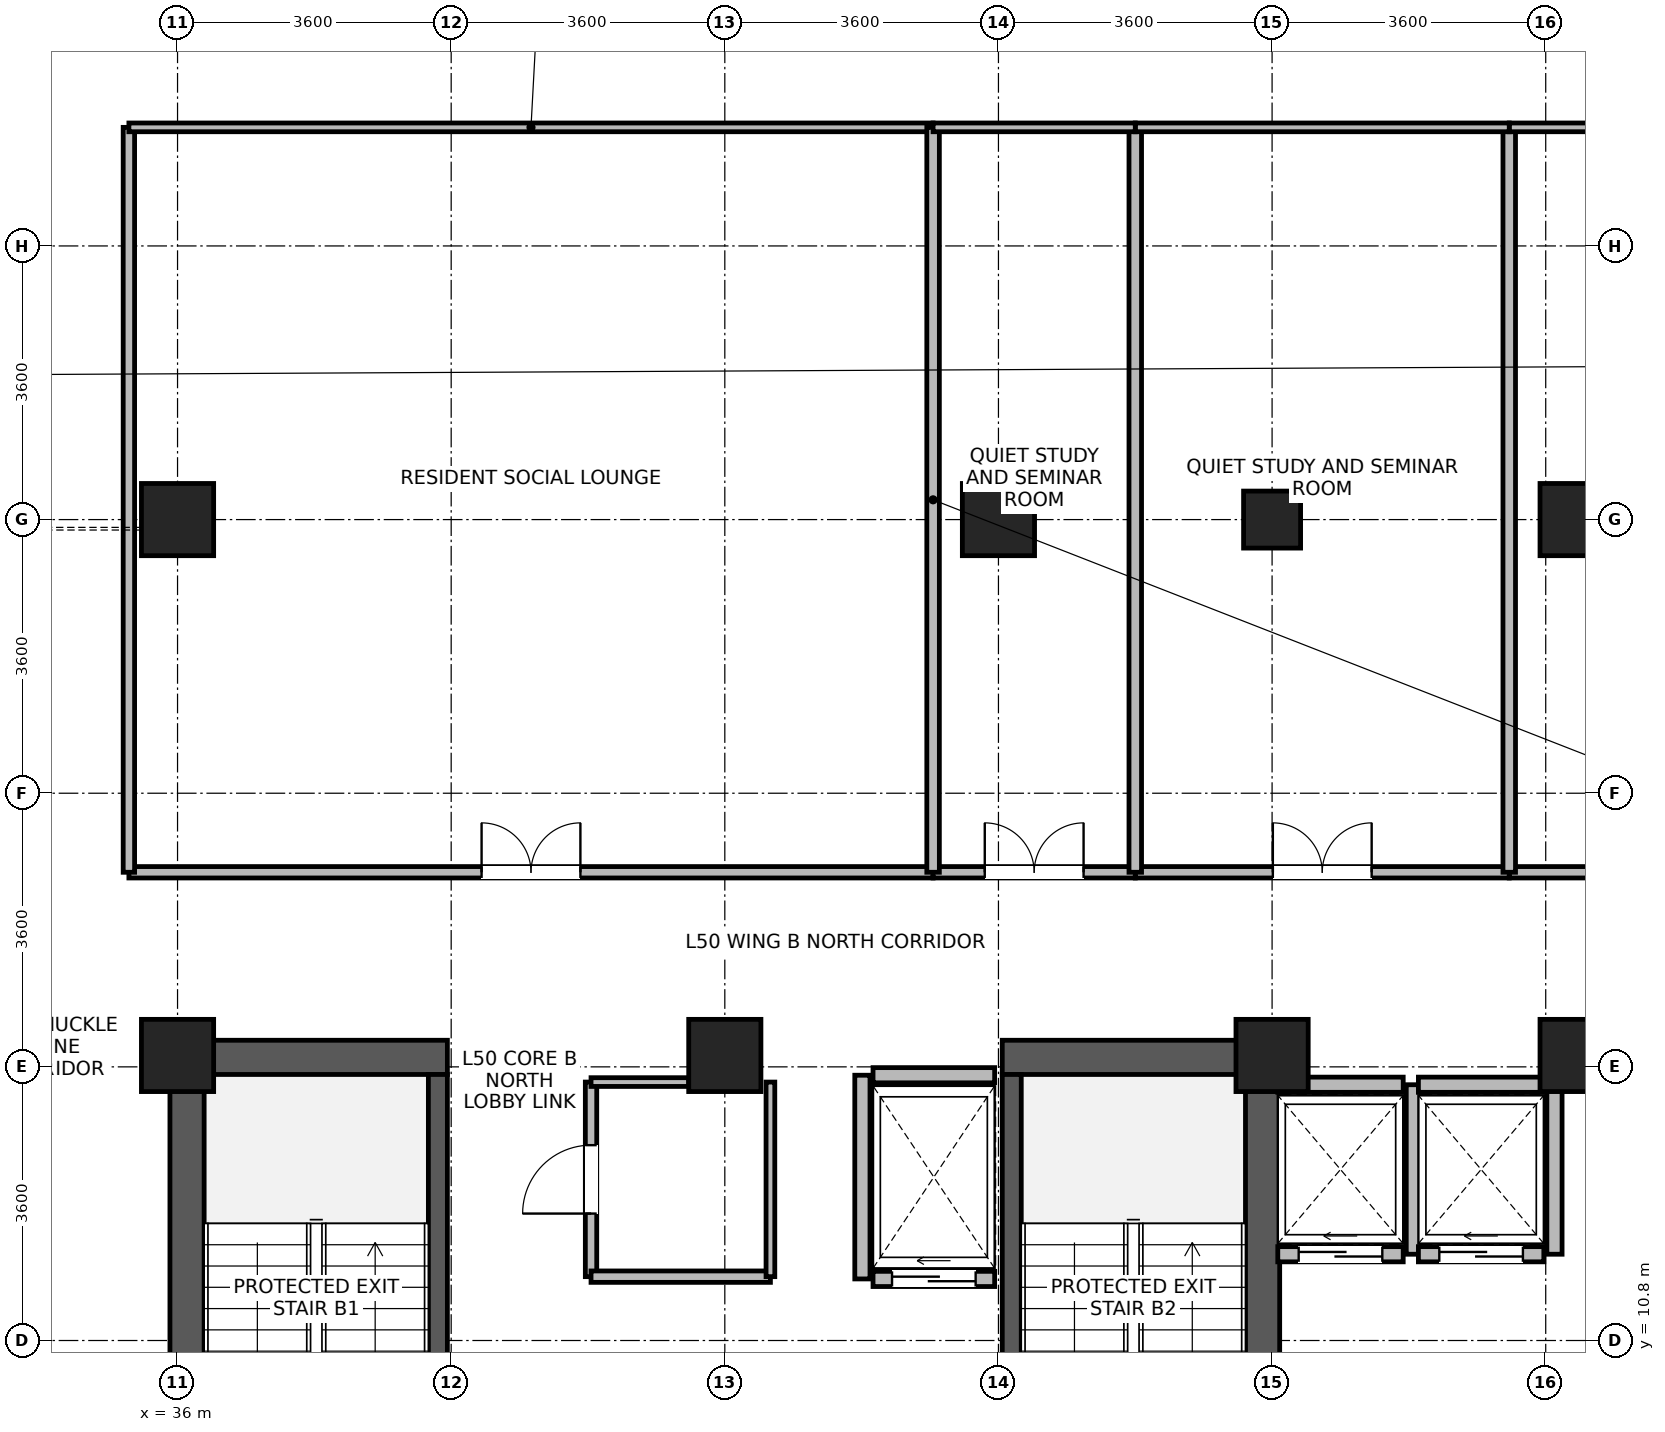
"""IFC4 building model, lengths in metres.
Left out: names, types, materials, properties, quantities, classifications, styles, units other than length and angle.
Written with IfcOpenShell. Run it as: python <this file> out.ifc"""

import sys

from ifc_helpers import new_model, si_unit, direction, frame, frame_2d, origin, origin_2d, place, context, subcontext, project, spatial, rectangle, extrude, source, transform, mapped, element, fill, save


model = new_model("IFC4")
c1 = context("Model", 3, precision=1e-05, world=origin(), true_north=direction((0.0, 1.0)))
c2 = subcontext(c1, "Body", "Model", "MODEL_VIEW")
j1 = project(units=[si_unit("LENGTHUNIT", "METRE"), si_unit("PLANEANGLEUNIT", "RADIAN")], contexts=[c1])
p1 = place(None, origin())
s1 = spatial("IfcSite", under=j1, at=p1, CompositionType="ELEMENT")
p2 = place(p1, origin())
s2 = spatial("IfcBuilding", under=s1, at=p2, CompositionType="ELEMENT")
p3 = place(p2, frame((0.0, 0.0, 197.2)))
s3 = spatial("IfcBuildingStorey", under=s2, at=p3, CompositionType="ELEMENT", Elevation=197.2)
for number, where, z_axis, x_axis in (
    (1, (36.125, 6.85, 0.0), (0.0, 0.0, 1.0), (0.0, 1.0, 0.0)),
    (2, (50.275, 6.85, 0.0), (0.0, 0.0, 1.0), (0.0, 1.0, 0.0)),
):
    element("IfcWall", number, at=place(p3, frame(where, z_axis=z_axis, x_axis=x_axis)), inside=s3, PredefinedType="SHEAR", context=c2, shape_type="SweptSolid", body=[
        extrude(rectangle(XDim=7.9, YDim=0.45, at=frame_2d((3.95, 0.0))), origin(), (0.0, 0.0, 1.0), 4.37),
    ])
for number, where, z_axis, x_axis in (
    (3, (36.35, 14.525, 0.0), (0.0, 0.0, 1.0), (1.0, 0.0, 0.0)),
    (4, (46.85, 14.525, 0.0), (0.0, 0.0, 1.0), (1.0, 0.0, 0.0)),
):
    element("IfcWall", number, at=place(p3, frame(where, z_axis=z_axis, x_axis=x_axis)), inside=s3, PredefinedType="SHEAR", context=c2, shape_type="SweptSolid", body=[
        extrude(rectangle(XDim=3.2, YDim=0.45, at=frame_2d((1.6, 0.0))), origin(), (0.0, 0.0, 1.0), 4.37),
    ])
p4 = place(p3, frame((39.425, 7.3, 0.0), z_axis=(0.0, 0.0, 1.0), x_axis=(0.0, 1.0, 0.0)))
e5 = element("IfcWall", 5, at=p4, inside=s3, PredefinedType="SHEAR", context=c2, shape_type="SweptSolid", body=[
    extrude(rectangle(XDim=7.0, YDim=0.25, at=frame_2d((3.5, 0.0))), origin(), (0.0, 0.0, 1.0), 4.37),
])
p5 = place(p4, frame((0.15, 0.0, 0.0)))
e6 = element("IfcOpeningElement", 6, at=p5, cuts=e5, PredefinedType="OPENING", context=c2, shape_type="SweptSolid", body=[
    extrude(rectangle(XDim=1.1, YDim=2.08, at=frame_2d((0.55, 1.04))), frame((0.0, 0.135, 0.0), z_axis=(0.0, -1.0, 0.0), x_axis=(1.0, 0.0, 0.0)), (0.0, 0.0, 1.0), 0.27),
])
p6 = place(p3, frame((46.975, 7.3, 0.0), z_axis=(0.0, 0.0, 1.0), x_axis=(0.0, 1.0, 0.0)))
e7 = element("IfcWall", 7, at=p6, inside=s3, PredefinedType="SHEAR", context=c2, shape_type="SweptSolid", body=[
    extrude(rectangle(XDim=7.0, YDim=0.25, at=frame_2d((3.5, 0.0))), origin(), (0.0, 0.0, 1.0), 4.37),
])
p7 = place(p6, frame((0.15, 0.0, 0.0)))
e8 = element("IfcOpeningElement", 8, at=p7, cuts=e7, PredefinedType="OPENING", context=c2, shape_type="SweptSolid", body=[
    extrude(rectangle(XDim=1.1, YDim=2.08, at=frame_2d((0.55, 1.04))), frame((0.0, 0.135, 0.0), z_axis=(0.0, -1.0, 0.0), x_axis=(1.0, 0.0, 0.0)), (0.0, 0.0, 1.0), 0.27),
])
m1 = source(origin(), c2, "Body", "SweptSolid", [
    extrude(rectangle(XDim=0.95, YDim=0.95, at=origin_2d()), origin(), (0.0, 0.0, 1.0), 4.6),
])
for number, where, z_axis, x_axis in (
    (9, (36.0, 21.6, 0.0), (0.0, 0.0, 1.0), (1.0, 0.0, 0.0)),
    (10, (46.8, 21.6, 0.0), (0.0, 0.0, 1.0), (1.0, 0.0, 0.0)),
    (11, (36.0, 14.55, 0.0), (0.0, 0.0, 1.0), (1.0, 0.0, 0.0)),
    (12, (43.2, 14.55, 0.0), (0.0, 0.0, 1.0), (1.0, 0.0, 0.0)),
    (13, (50.4, 14.55, 0.0), (0.0, 0.0, 1.0), (1.0, 0.0, 0.0)),
):
    element("IfcColumn", number, at=place(p3, frame(where, z_axis=z_axis, x_axis=x_axis)), inside=s3, PredefinedType="COLUMN", context=c2, shape_type="MappedRepresentation", body=[
        mapped(m1, transform((0.0, 0.0, 0.0), x_axis=(1.0, 0.0, 0.0), y_axis=(0.0, 1.0, 0.0), z_axis=(0.0, 0.0, 1.0), scale=1.0)),
    ])
m2 = source(origin(), c2, "Body", "SweptSolid", [
    extrude(rectangle(XDim=0.75, YDim=0.75, at=origin_2d()), origin(), (0.0, 0.0, 1.0), 4.6),
])
p8 = place(p3, frame((50.4, 21.6, 0.0), z_axis=(0.0, 0.0, 1.0), x_axis=(1.0, 0.0, 0.0)))
e14 = element("IfcColumn", 14, at=p8, inside=s3, PredefinedType="PILASTER", context=c2, shape_type="MappedRepresentation", body=[
    mapped(m2, transform((0.0, 0.0, 0.0), x_axis=(1.0, 0.0, 0.0), y_axis=(0.0, 1.0, 0.0), z_axis=(0.0, 0.0, 1.0), scale=1.0)),
])
for number, where, z_axis, x_axis in (
    (15, (54.4, 14.55, 0.0), (0.0, 0.0, 1.0), (1.0, 0.0, 0.0)),
    (16, (54.4, 21.6, 0.0), (0.0, 0.0, 1.0), (1.0, 0.0, 0.0)),
):
    element("IfcColumn", number, at=place(p3, frame(where, z_axis=z_axis, x_axis=x_axis)), inside=s3, PredefinedType="COLUMN", context=c2, shape_type="MappedRepresentation", body=[
        mapped(m1, transform((0.0, 0.0, 0.0), x_axis=(1.0, 0.0, 0.0), y_axis=(0.0, 1.0, 0.0), z_axis=(0.0, 0.0, 1.0), scale=1.0)),
    ])
p9 = place(p3, frame((50.475, 11.935, 0.0), z_axis=(0.0, 0.0, 1.0), x_axis=(1.0, 0.0, 0.0)))
e17 = element("IfcWall", 17, at=p9, inside=s3, PredefinedType="PARTITIONING", context=c2, shape_type="SweptSolid", body=[
    extrude(rectangle(XDim=1.65, YDim=0.2, at=frame_2d((0.825, 0.0))), origin(), (0.0, 0.0, 1.0), 4.35),
])
p10 = place(p9, frame((0.275, 0.0, 0.0)))
e18 = element("IfcOpeningElement", 18, at=p10, cuts=e17, PredefinedType="OPENING", context=c2, shape_type="SweptSolid", body=[
    extrude(rectangle(XDim=1.1, YDim=2.12, at=frame_2d((0.55, 1.06))), frame((0.0, 0.11, 0.0), z_axis=(0.0, -1.0, 0.0), x_axis=(1.0, 0.0, 0.0)), (0.0, 0.0, 1.0), 0.22),
])
p11 = place(p3, frame((50.475, 14.165, 0.0), z_axis=(0.0, 0.0, 1.0), x_axis=(1.0, 0.0, 0.0)))
e19 = element("IfcWall", 19, at=p11, inside=s3, PredefinedType="PARTITIONING", context=c2, shape_type="SweptSolid", body=[
    extrude(rectangle(XDim=1.65, YDim=0.2, at=frame_2d((0.825, 0.0))), origin(), (0.0, 0.0, 1.0), 4.35),
])
p12 = place(p3, frame((52.265, 11.935, 0.0), z_axis=(0.0, 0.0, 1.0), x_axis=(0.0, 1.0, 0.0)))
e20 = element("IfcWall", 20, at=p12, inside=s3, PredefinedType="PARTITIONING", context=c2, shape_type="SweptSolid", body=[
    extrude(rectangle(XDim=2.23, YDim=0.2, at=frame_2d((1.115, 0.0))), origin(), (0.0, 0.0, 1.0), 4.35),
])
p13 = place(p3, frame((52.325, 11.935, 0.0), z_axis=(0.0, 0.0, 1.0), x_axis=(1.0, 0.0, 0.0)))
e21 = element("IfcWall", 21, at=p13, inside=s3, PredefinedType="PARTITIONING", context=c2, shape_type="SweptSolid", body=[
    extrude(rectangle(XDim=1.65, YDim=0.2, at=frame_2d((0.825, 0.0))), origin(), (0.0, 0.0, 1.0), 4.35),
])
p14 = place(p13, frame((0.275, 0.0, 0.0)))
e22 = element("IfcOpeningElement", 22, at=p14, cuts=e21, PredefinedType="OPENING", context=c2, shape_type="SweptSolid", body=[
    extrude(rectangle(XDim=1.1, YDim=2.12, at=frame_2d((0.55, 1.06))), frame((0.0, 0.11, 0.0), z_axis=(0.0, -1.0, 0.0), x_axis=(1.0, 0.0, 0.0)), (0.0, 0.0, 1.0), 0.22),
])
p15 = place(p3, frame((52.325, 14.165, 0.0), z_axis=(0.0, 0.0, 1.0), x_axis=(1.0, 0.0, 0.0)))
e23 = element("IfcWall", 23, at=p15, inside=s3, PredefinedType="PARTITIONING", context=c2, shape_type="SweptSolid", body=[
    extrude(rectangle(XDim=1.65, YDim=0.2, at=frame_2d((0.825, 0.0))), origin(), (0.0, 0.0, 1.0), 4.35),
])
p16 = place(p3, frame((54.115, 11.935, 0.0), z_axis=(0.0, 0.0, 1.0), x_axis=(0.0, 1.0, 0.0)))
e24 = element("IfcWall", 24, at=p16, inside=s3, PredefinedType="PARTITIONING", context=c2, shape_type="SweptSolid", body=[
    extrude(rectangle(XDim=2.23, YDim=0.2, at=frame_2d((1.115, 0.0))), origin(), (0.0, 0.0, 1.0), 4.35),
])
p17 = place(p3, frame((45.15, 11.61, 0.0), z_axis=(0.0, 0.0, 1.0), x_axis=(1.0, 0.0, 0.0)))
e25 = element("IfcWall", 25, at=p17, inside=s3, PredefinedType="PARTITIONING", context=c2, shape_type="SweptSolid", body=[
    extrude(rectangle(XDim=1.6, YDim=0.2, at=frame_2d((0.8, 0.0))), origin(), (0.0, 0.0, 1.0), 4.35),
])
p18 = place(p17, frame((0.25, 0.0, 0.0)))
e26 = element("IfcOpeningElement", 26, at=p18, cuts=e25, PredefinedType="OPENING", context=c2, shape_type="SweptSolid", body=[
    extrude(rectangle(XDim=1.1, YDim=2.12, at=frame_2d((0.55, 1.06))), frame((0.0, 0.11, 0.0), z_axis=(0.0, -1.0, 0.0), x_axis=(1.0, 0.0, 0.0)), (0.0, 0.0, 1.0), 0.22),
])
p19 = place(p3, frame((45.15, 14.29, 0.0), z_axis=(0.0, 0.0, 1.0), x_axis=(1.0, 0.0, 0.0)))
e27 = element("IfcWall", 27, at=p19, inside=s3, PredefinedType="PARTITIONING", context=c2, shape_type="SweptSolid", body=[
    extrude(rectangle(XDim=1.6, YDim=0.2, at=frame_2d((0.8, 0.0))), origin(), (0.0, 0.0, 1.0), 3.35),
])
p20 = place(p3, frame((45.01, 11.61, 0.0), z_axis=(0.0, 0.0, 1.0), x_axis=(0.0, 1.0, 0.0)))
e28 = element("IfcWall", 28, at=p20, inside=s3, PredefinedType="PARTITIONING", context=c2, shape_type="SweptSolid", body=[
    extrude(rectangle(XDim=2.68, YDim=0.2, at=frame_2d((1.34, 0.0))), origin(), (0.0, 0.0, 1.0), 4.35),
])
p21 = place(p3, frame((35.36, 16.96, 0.0), z_axis=(0.0, 0.0, 1.0), x_axis=(1.0, 0.0, 0.0)))
e29 = element("IfcWall", 29, at=p21, inside=s3, PredefinedType="PARTITIONING", context=c2, shape_type="SweptSolid", body=[
    extrude(rectangle(XDim=10.58, YDim=0.15, at=frame_2d((5.29, 0.0))), origin(), (0.0, 0.0, 1.0), 4.35),
])
p22 = place(p21, frame((4.64, 0.0, 0.0)))
e30 = element("IfcOpeningElement", 30, at=p22, cuts=e29, PredefinedType="OPENING", context=c2, shape_type="SweptSolid", body=[
    extrude(rectangle(XDim=1.3, YDim=2.12, at=frame_2d((0.65, 1.06))), frame((0.0, 0.085, 0.0), z_axis=(0.0, -1.0, 0.0), x_axis=(1.0, 0.0, 0.0)), (0.0, 0.0, 1.0), 0.17),
])
p23 = place(p3, frame((35.36, 16.96, 0.0), z_axis=(0.0, 0.0, 1.0), x_axis=(0.0, 1.0, 0.0)))
e31 = element("IfcWall", 31, at=p23, inside=s3, PredefinedType="PARTITIONING", context=c2, shape_type="SweptSolid", body=[
    extrude(rectangle(XDim=9.8, YDim=0.15, at=frame_2d((4.9, 0.0))), origin(), (0.0, 0.0, 1.0), 4.35),
])
p24 = place(p3, frame((53.52, 16.96, 0.0), z_axis=(0.0, 0.0, 1.0), x_axis=(1.0, 0.0, 0.0)))
e32 = element("IfcWall", 32, at=p24, inside=s3, PredefinedType="PARTITIONING", context=c2, shape_type="SweptSolid", body=[
    extrude(rectangle(XDim=7.048, YDim=0.15, at=frame_2d((3.524, 0.0))), origin(), (0.0, 0.0, 1.0), 4.35),
])
p25 = place(p24, frame((2.874, 0.0, 0.0)))
e33 = element("IfcOpeningElement", 33, at=p25, cuts=e32, PredefinedType="OPENING", context=c2, shape_type="SweptSolid", body=[
    extrude(rectangle(XDim=1.3, YDim=2.12, at=frame_2d((0.65, 1.06))), frame((0.0, 0.085, 0.0), z_axis=(0.0, -1.0, 0.0), x_axis=(1.0, 0.0, 0.0)), (0.0, 0.0, 1.0), 0.17),
])
p26 = place(p3, frame((48.6, 16.96, 0.0), z_axis=(0.0, 0.0, 1.0), x_axis=(1.0, 0.0, 0.0)))
e34 = element("IfcWall", 34, at=p26, inside=s3, PredefinedType="PARTITIONING", context=c2, shape_type="SweptSolid", body=[
    extrude(rectangle(XDim=4.92, YDim=0.15, at=frame_2d((2.46, 0.0))), origin(), (0.0, 0.0, 1.0), 4.35),
])
p27 = place(p26, frame((1.81, 0.0, 0.0)))
e35 = element("IfcOpeningElement", 35, at=p27, cuts=e34, PredefinedType="OPENING", context=c2, shape_type="SweptSolid", body=[
    extrude(rectangle(XDim=1.3, YDim=2.12, at=frame_2d((0.65, 1.06))), frame((0.0, 0.085, 0.0), z_axis=(0.0, -1.0, 0.0), x_axis=(1.0, 0.0, 0.0)), (0.0, 0.0, 1.0), 0.17),
])
p28 = place(p3, frame((45.94, 16.96, 0.0), z_axis=(0.0, 0.0, 1.0), x_axis=(1.0, 0.0, 0.0)))
e36 = element("IfcWall", 36, at=p28, inside=s3, PredefinedType="PARTITIONING", context=c2, shape_type="SweptSolid", body=[
    extrude(rectangle(XDim=2.66, YDim=0.15, at=frame_2d((1.33, 0.0))), origin(), (0.0, 0.0, 1.0), 4.35),
])
p29 = place(p28, frame((0.68, 0.0, 0.0)))
e37 = element("IfcOpeningElement", 37, at=p29, cuts=e36, PredefinedType="OPENING", context=c2, shape_type="SweptSolid", body=[
    extrude(rectangle(XDim=1.3, YDim=2.12, at=frame_2d((0.65, 1.06))), frame((0.0, 0.085, 0.0), z_axis=(0.0, -1.0, 0.0), x_axis=(1.0, 0.0, 0.0)), (0.0, 0.0, 1.0), 0.17),
])
p30 = place(p3, frame((41.44, 11.64, 0.0), z_axis=(0.0, 0.0, 1.0), x_axis=(0.0, 1.0, 0.0)))
e38 = element("IfcWall", 38, at=p30, inside=s3, PredefinedType="PARTITIONING", context=c2, shape_type="SweptSolid", body=[
    extrude(rectangle(XDim=2.56, YDim=0.15, at=frame_2d((1.28, 0.0))), origin(), (0.0, 0.0, 1.0), 4.35),
])
p31 = place(p30, frame((0.83, 0.0, 0.0)))
e39 = element("IfcOpeningElement", 39, at=p31, cuts=e38, PredefinedType="OPENING", context=c2, shape_type="SweptSolid", body=[
    extrude(rectangle(XDim=0.9, YDim=2.08, at=frame_2d((0.45, 1.04))), frame((0.0, 0.085, 0.0), z_axis=(0.0, -1.0, 0.0), x_axis=(1.0, 0.0, 0.0)), (0.0, 0.0, 1.0), 0.17),
])
p32 = place(p3, frame((41.44, 11.64, 0.0), z_axis=(0.0, 0.0, 1.0), x_axis=(1.0, 0.0, 0.0)))
e40 = element("IfcWall", 40, at=p32, inside=s3, PredefinedType="PARTITIONING", context=c2, shape_type="SweptSolid", body=[
    extrude(rectangle(XDim=2.36, YDim=0.15, at=frame_2d((1.18, 0.0))), origin(), (0.0, 0.0, 1.0), 4.35),
])
p33 = place(p3, frame((35.36, 26.76, 0.0), z_axis=(0.0, 0.0, 1.0), x_axis=(1.0, 0.0, 0.0)))
e41 = element("IfcWall", 41, at=p33, inside=s3, PredefinedType="PARTITIONING", context=c2, shape_type="SweptSolid", body=[
    extrude(rectangle(XDim=10.58, YDim=0.115, at=frame_2d((5.29, 0.0))), origin(), (0.0, 0.0, 1.0), 4.35),
])
for number, where, z_axis, x_axis in (
    (42, (45.94, 16.96, 0.0), (0.0, 0.0, 1.0), (0.0, 1.0, 0.0)),
    (43, (48.6, 16.96, 0.0), (0.0, 0.0, 1.0), (0.0, 1.0, 0.0)),
    (44, (53.52, 16.96, 0.0), (0.0, 0.0, 1.0), (0.0, 1.0, 0.0)),
):
    element("IfcWall", number, at=place(p3, frame(where, z_axis=z_axis, x_axis=x_axis)), inside=s3, PredefinedType="PARTITIONING", context=c2, shape_type="SweptSolid", body=[
        extrude(rectangle(XDim=9.8, YDim=0.165, at=frame_2d((4.9, 0.0))), origin(), (0.0, 0.0, 1.0), 4.35),
    ])
p34 = place(p3, frame((53.52, 26.76, 0.0), z_axis=(0.0, 0.0, 1.0), x_axis=(1.0, 0.0, 0.0)))
e45 = element("IfcWall", 45, at=p34, inside=s3, PredefinedType="PARTITIONING", context=c2, shape_type="SweptSolid", body=[
    extrude(rectangle(XDim=7.048, YDim=0.115, at=frame_2d((3.524, 0.0))), origin(), (0.0, 0.0, 1.0), 4.35),
])
p35 = place(p3, frame((48.6, 26.76, 0.0), z_axis=(0.0, 0.0, 1.0), x_axis=(1.0, 0.0, 0.0)))
e46 = element("IfcWall", 46, at=p35, inside=s3, PredefinedType="PARTITIONING", context=c2, shape_type="SweptSolid", body=[
    extrude(rectangle(XDim=4.92, YDim=0.115, at=frame_2d((2.46, 0.0))), origin(), (0.0, 0.0, 1.0), 4.35),
])
p36 = place(p3, frame((45.94, 26.76, 0.0), z_axis=(0.0, 0.0, 1.0), x_axis=(1.0, 0.0, 0.0)))
e47 = element("IfcWall", 47, at=p36, inside=s3, PredefinedType="PARTITIONING", context=c2, shape_type="SweptSolid", body=[
    extrude(rectangle(XDim=2.66, YDim=0.115, at=frame_2d((1.33, 0.0))), origin(), (0.0, 0.0, 1.0), 4.35),
])
p37 = place(p3, frame((43.8, 11.64, 0.0), z_axis=(0.0, 0.0, 1.0), x_axis=(0.0, 1.0, 0.0)))
e48 = element("IfcWall", 48, at=p37, inside=s3, PredefinedType="PARTITIONING", context=c2, shape_type="SweptSolid", body=[
    extrude(rectangle(XDim=2.56, YDim=0.115, at=frame_2d((1.28, 0.0))), origin(), (0.0, 0.0, 1.0), 4.35),
])
p38 = place(p3, frame((41.44, 14.2, 0.0), z_axis=(0.0, 0.0, 1.0), x_axis=(1.0, 0.0, 0.0)))
e49 = element("IfcWall", 49, at=p38, inside=s3, PredefinedType="PARTITIONING", context=c2, shape_type="SweptSolid", body=[
    extrude(rectangle(XDim=1.285, YDim=0.115, at=frame_2d((0.643, 0.0))), origin(), (0.0, 0.0, 1.0), 3.35),
])
p39 = place(p10, origin())
e50 = element("IfcDoor", 50, at=p39, inside=s3, OperationType="SLIDING_TO_LEFT", PredefinedType="DOOR", context=c2, shape_type="SweptSolid", body=[
    extrude(rectangle(XDim=1.1, YDim=2.12, at=frame_2d((0.55, 1.06))), frame((0.0, 0.025, 0.0), z_axis=(0.0, -1.0, 0.0), x_axis=(1.0, 0.0, 0.0)), (0.0, 0.0, 1.0), 0.05),
])
fill(e18, e50)
p40 = place(p14, origin())
e51 = element("IfcDoor", 51, at=p40, inside=s3, OperationType="SLIDING_TO_LEFT", PredefinedType="DOOR", context=c2, shape_type="SweptSolid", body=[
    extrude(rectangle(XDim=1.1, YDim=2.12, at=frame_2d((0.55, 1.06))), frame((0.0, 0.025, 0.0), z_axis=(0.0, -1.0, 0.0), x_axis=(1.0, 0.0, 0.0)), (0.0, 0.0, 1.0), 0.05),
])
fill(e22, e51)
p41 = place(p18, origin())
e52 = element("IfcDoor", 52, at=p41, inside=s3, OperationType="SLIDING_TO_LEFT", PredefinedType="DOOR", context=c2, shape_type="SweptSolid", body=[
    extrude(rectangle(XDim=1.1, YDim=2.12, at=frame_2d((0.55, 1.06))), frame((0.0, 0.025, 0.0), z_axis=(0.0, -1.0, 0.0), x_axis=(1.0, 0.0, 0.0)), (0.0, 0.0, 1.0), 0.05),
])
fill(e26, e52)
p42 = place(p22, origin())
e53 = element("IfcDoor", 53, at=p42, inside=s3, OperationType="DOUBLE_DOOR_SINGLE_SWING", PredefinedType="DOOR", context=c2, shape_type="SweptSolid", body=[
    extrude(rectangle(XDim=1.3, YDim=2.12, at=frame_2d((0.65, 1.06))), frame((0.0, 0.025, 0.0), z_axis=(0.0, -1.0, 0.0), x_axis=(1.0, 0.0, 0.0)), (0.0, 0.0, 1.0), 0.05),
])
fill(e30, e53)
p43 = place(p27, origin())
e54 = element("IfcDoor", 54, at=p43, inside=s3, OperationType="DOUBLE_DOOR_SINGLE_SWING", PredefinedType="DOOR", context=c2, shape_type="SweptSolid", body=[
    extrude(rectangle(XDim=1.3, YDim=2.12, at=frame_2d((0.65, 1.06))), frame((0.0, 0.025, 0.0), z_axis=(0.0, -1.0, 0.0), x_axis=(1.0, 0.0, 0.0)), (0.0, 0.0, 1.0), 0.05),
])
fill(e35, e54)
p44 = place(p29, origin())
e55 = element("IfcDoor", 55, at=p44, inside=s3, OperationType="DOUBLE_DOOR_SINGLE_SWING", PredefinedType="DOOR", context=c2, shape_type="SweptSolid", body=[
    extrude(rectangle(XDim=1.3, YDim=2.12, at=frame_2d((0.65, 1.06))), frame((0.0, 0.025, 0.0), z_axis=(0.0, -1.0, 0.0), x_axis=(1.0, 0.0, 0.0)), (0.0, 0.0, 1.0), 0.05),
])
fill(e37, e55)
p45 = place(p31, origin())
e56 = element("IfcDoor", 56, at=p45, inside=s3, OperationType="SINGLE_SWING_LEFT", PredefinedType="DOOR", context=c2, shape_type="SweptSolid", body=[
    extrude(rectangle(XDim=0.9, YDim=2.08, at=frame_2d((0.45, 1.04))), frame((0.0, 0.025, 0.0), z_axis=(0.0, -1.0, 0.0), x_axis=(1.0, 0.0, 0.0)), (0.0, 0.0, 1.0), 0.05),
])
fill(e39, e56)
save(model, sys.argv[1])
